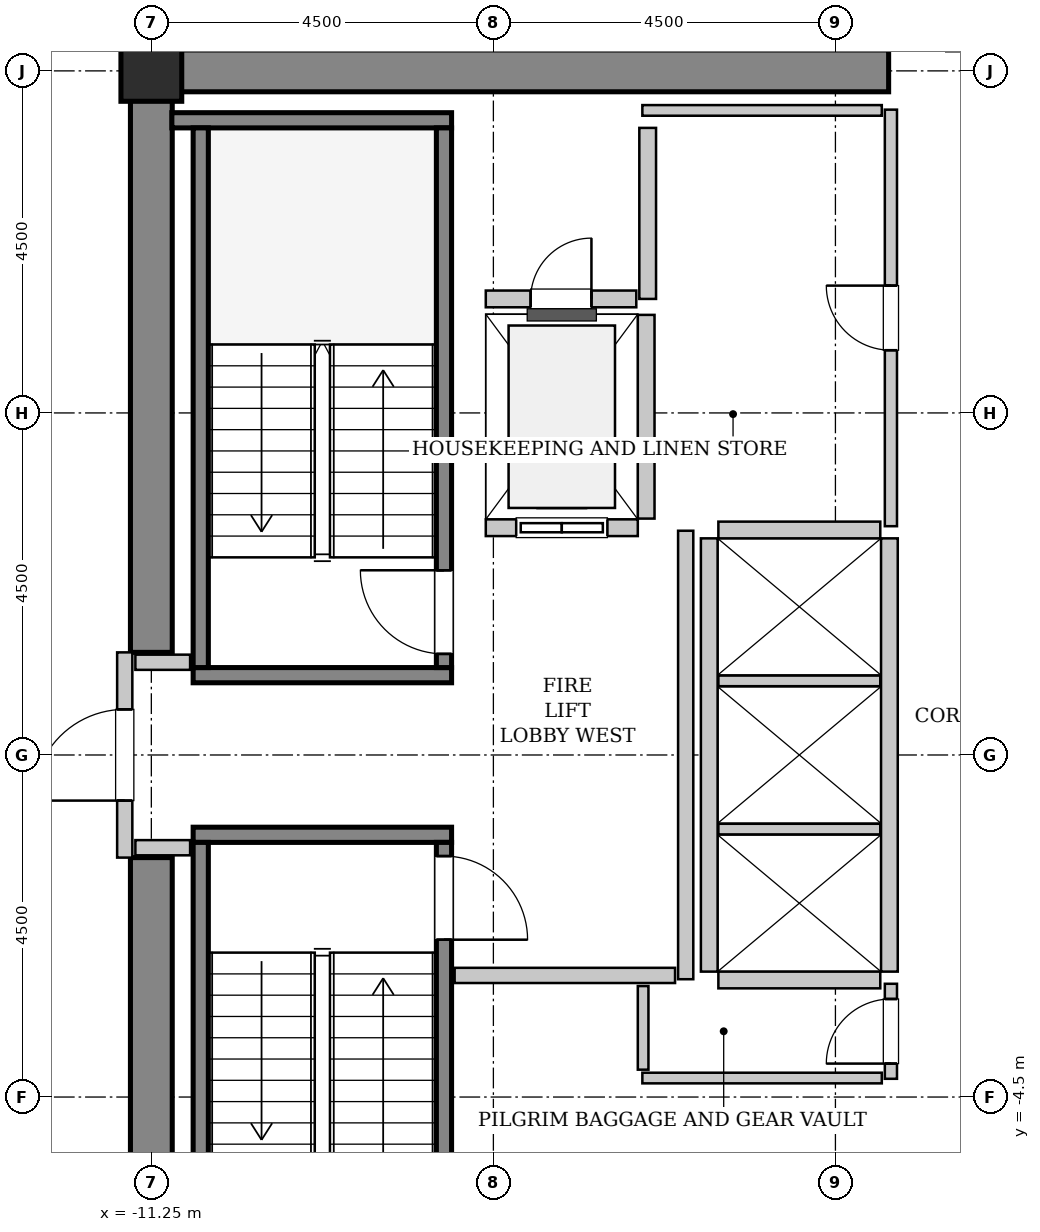
"""IFC4 building model, lengths in metres.
Left out: names, types, materials, properties, quantities, classifications, styles, units other than length and angle.
Written with IfcOpenShell. Run it as: python <this file> out.ifc"""

import sys

from ifc_helpers import new_model, si_unit, direction, frame, frame_2d, origin, origin_2d, place, context, subcontext, project, spatial, rectangle, hollow_rectangle, extrude, source, transform, mapped, element, fill, save


model = new_model("IFC4")
c1 = context("Model", 3, precision=1e-05, world=origin(), true_north=direction((0.0, 1.0)))
c2 = subcontext(c1, "Body", "Model", "MODEL_VIEW")
j1 = project(units=[si_unit("LENGTHUNIT", "METRE"), si_unit("PLANEANGLEUNIT", "RADIAN")], contexts=[c1])
p1 = place(None, origin())
s1 = spatial("IfcSite", under=j1, at=p1, CompositionType="ELEMENT")
p2 = place(p1, origin())
s2 = spatial("IfcBuilding", under=s1, at=p2, CompositionType="ELEMENT")
p3 = place(p2, frame((0.0, 0.0, 194.4)))
s3 = spatial("IfcBuildingStorey", under=s2, at=p3, CompositionType="ELEMENT", Elevation=194.4)
m1 = source(origin(), c2, "Body", "SweptSolid", [
    extrude(rectangle(XDim=9.975, YDim=0.55, at=frame_2d((4.987, 0.0))), origin(), (0.0, 0.0, 1.0), 3.8),
])
p4 = place(p3, frame((-11.525, 9.0, 0.0), z_axis=(0.0, 0.0, 1.0), x_axis=(1.0, 0.0, 0.0)))
e1 = element("IfcWall", 1, at=p4, inside=s3, PredefinedType="SHEAR", context=c2, shape_type="MappedRepresentation", body=[
    mapped(m1, transform((0.0, 0.0, 0.0), x_axis=(1.0, 0.0, 0.0), y_axis=(0.0, 1.0, 0.0), z_axis=(0.0, 0.0, 1.0), scale=1.0)),
])
m2 = source(origin(), c2, "Body", "SweptSolid", [
    extrude(rectangle(XDim=7.375, YDim=0.55, at=frame_2d((3.688, 0.0))), origin(), (0.0, 0.0, 1.0), 3.8),
])
for number, where, z_axis, x_axis in (
    (2, (-11.25, -8.725, 0.0), (0.0, 0.0, 1.0), (0.0, 1.0, 0.0)),
    (3, (-11.25, 1.35, 0.0), (0.0, 0.0, 1.0), (0.0, 1.0, 0.0)),
):
    element("IfcWall", number, at=place(p3, frame(where, z_axis=z_axis, x_axis=x_axis)), inside=s3, PredefinedType="SHEAR", context=c2, shape_type="MappedRepresentation", body=[
        mapped(m2, transform((0.0, 0.0, 0.0), x_axis=(1.0, 0.0, 0.0), y_axis=(0.0, 1.0, 0.0), z_axis=(0.0, 0.0, 1.0), scale=1.0)),
    ])
m3 = source(origin(), c2, "Body", "SweptSolid", [
    extrude(hollow_rectangle(XDim=0.8, YDim=0.8, WallThickness=0.04, InnerFilletRadius=0.04, OuterFilletRadius=0.08, at=origin_2d()), origin(), (0.0, 0.0, 1.0), 3.8),
])
p5 = place(p3, frame((-11.25, 9.0, 0.0), z_axis=(0.0, 0.0, 1.0), x_axis=(1.0, 0.0, 0.0)))
e4 = element("IfcColumn", 4, at=p5, inside=s3, PredefinedType="COLUMN", context=c2, shape_type="MappedRepresentation", body=[
    mapped(m3, transform((0.0, 0.0, 0.0), x_axis=(1.0, 0.0, 0.0), y_axis=(0.0, 1.0, 0.0), z_axis=(0.0, 0.0, 1.0), scale=1.0)),
])
m4 = source(origin(), c2, "Body", "SweptSolid", [
    extrude(rectangle(XDim=3.4, YDim=0.2, at=frame_2d((1.7, 0.0))), origin(), (0.0, 0.0, 1.0), 3.8),
])
p6 = place(p3, frame((-7.3, 1.05, 0.0), z_axis=(0.0, 0.0, 1.0), x_axis=(-1.0, 0.0, 0.0)))
e5 = element("IfcWall", 5, at=p6, inside=s3, PredefinedType="SOLIDWALL", context=c2, shape_type="MappedRepresentation", body=[
    mapped(m4, transform((0.0, 0.0, 0.0), x_axis=(1.0, 0.0, 0.0), y_axis=(0.0, 1.0, 0.0), z_axis=(0.0, 0.0, 1.0), scale=1.0)),
])
m5 = source(origin(), c2, "Body", "SweptSolid", [
    extrude(rectangle(XDim=3.68, YDim=0.2, at=frame_2d((1.84, 0.0))), origin(), (0.0, 0.0, 1.0), 3.8),
])
p7 = place(p3, frame((-7.3, 8.35, 0.0), z_axis=(0.0, 0.0, 1.0), x_axis=(-1.0, 0.0, 0.0)))
e6 = element("IfcWall", 6, at=p7, inside=s3, PredefinedType="SOLIDWALL", context=c2, shape_type="MappedRepresentation", body=[
    mapped(m5, transform((0.0, 0.0, 0.0), x_axis=(1.0, 0.0, 0.0), y_axis=(0.0, 1.0, 0.0), z_axis=(0.0, 0.0, 1.0), scale=1.0)),
])
m6 = source(origin(), c2, "Body", "SweptSolid", [
    extrude(rectangle(XDim=7.1, YDim=0.2, at=frame_2d((3.55, 0.0))), origin(), (0.0, 0.0, 1.0), 3.8),
])
p8 = place(p3, frame((-7.4, 1.15, 0.0), z_axis=(0.0, 0.0, 1.0), x_axis=(0.0, 1.0, 0.0)))
e7 = element("IfcWall", 7, at=p8, inside=s3, PredefinedType="SOLIDWALL", context=c2, shape_type="MappedRepresentation", body=[
    mapped(m6, transform((0.0, 0.0, 0.0), x_axis=(1.0, 0.0, 0.0), y_axis=(0.0, 1.0, 0.0), z_axis=(0.0, 0.0, 1.0), scale=1.0)),
])
p9 = place(p8, frame((0.18, 0.0, 0.0)))
e8 = element("IfcOpeningElement", 8, at=p9, cuts=e7, PredefinedType="OPENING", context=c2, shape_type="SweptSolid", body=[
    extrude(rectangle(XDim=1.1, YDim=2.15, at=frame_2d((0.55, 1.075))), frame((0.0, 0.11, 0.0), z_axis=(0.0, -1.0, 0.0), x_axis=(1.0, 0.0, 0.0)), (0.0, 0.0, 1.0), 0.22),
])
p10 = place(p3, frame((-10.6, 1.15, 0.0), z_axis=(0.0, 0.0, 1.0), x_axis=(0.0, 1.0, 0.0)))
e9 = element("IfcWall", 9, at=p10, inside=s3, PredefinedType="SOLIDWALL", context=c2, shape_type="MappedRepresentation", body=[
    mapped(m6, transform((0.0, 0.0, 0.0), x_axis=(1.0, 0.0, 0.0), y_axis=(0.0, 1.0, 0.0), z_axis=(0.0, 0.0, 1.0), scale=1.0)),
])
p11 = place(p3, frame((-10.7, -1.05, 0.0), z_axis=(0.0, 0.0, 1.0), x_axis=(1.0, 0.0, 0.0)))
e10 = element("IfcWall", 10, at=p11, inside=s3, PredefinedType="SOLIDWALL", context=c2, shape_type="MappedRepresentation", body=[
    mapped(m4, transform((0.0, 0.0, 0.0), x_axis=(1.0, 0.0, 0.0), y_axis=(0.0, 1.0, 0.0), z_axis=(0.0, 0.0, 1.0), scale=1.0)),
])
p12 = place(p3, frame((-10.6, -1.15, 0.0), z_axis=(0.0, 0.0, 1.0), x_axis=(0.0, -1.0, 0.0)))
e11 = element("IfcWall", 11, at=p12, inside=s3, PredefinedType="SOLIDWALL", context=c2, shape_type="MappedRepresentation", body=[
    mapped(m6, transform((0.0, 0.0, 0.0), x_axis=(1.0, 0.0, 0.0), y_axis=(0.0, 1.0, 0.0), z_axis=(0.0, 0.0, 1.0), scale=1.0)),
])
p13 = place(p3, frame((-7.4, -1.15, 0.0), z_axis=(0.0, 0.0, 1.0), x_axis=(0.0, -1.0, 0.0)))
e12 = element("IfcWall", 12, at=p13, inside=s3, PredefinedType="SOLIDWALL", context=c2, shape_type="MappedRepresentation", body=[
    mapped(m6, transform((0.0, 0.0, 0.0), x_axis=(1.0, 0.0, 0.0), y_axis=(0.0, 1.0, 0.0), z_axis=(0.0, 0.0, 1.0), scale=1.0)),
])
p14 = place(p13, frame((0.18, 0.0, 0.0)))
e13 = element("IfcOpeningElement", 13, at=p14, cuts=e12, PredefinedType="OPENING", context=c2, shape_type="SweptSolid", body=[
    extrude(rectangle(XDim=1.1, YDim=2.15, at=frame_2d((0.55, 1.075))), frame((0.0, 0.11, 0.0), z_axis=(0.0, -1.0, 0.0), x_axis=(1.0, 0.0, 0.0)), (0.0, 0.0, 1.0), 0.22),
])
m7 = source(origin(), c2, "Body", "SweptSolid", [
    extrude(rectangle(XDim=2.0, YDim=0.22, at=frame_2d((1.0, 0.0))), origin(), (0.0, 0.0, 1.0), 3.535),
])
p15 = place(p3, frame((-6.85, 2.99, 0.0), z_axis=(0.0, 0.0, 1.0), x_axis=(1.0, 0.0, 0.0)))
e14 = element("IfcWall", 14, at=p15, inside=s3, PredefinedType="SOLIDWALL", context=c2, shape_type="MappedRepresentation", body=[
    mapped(m7, transform((0.0, 0.0, 0.0), x_axis=(1.0, 0.0, 0.0), y_axis=(0.0, 1.0, 0.0), z_axis=(0.0, 0.0, 1.0), scale=1.0)),
])
p16 = place(p15, frame((0.4, 0.0, 0.0)))
e15 = element("IfcOpeningElement", 15, at=p16, cuts=e14, PredefinedType="OPENING", context=c2, shape_type="SweptSolid", body=[
    extrude(rectangle(XDim=1.2, YDim=2.2, at=frame_2d((0.6, 1.1))), frame((0.0, 0.12, 0.0), z_axis=(0.0, -1.0, 0.0), x_axis=(1.0, 0.0, 0.0)), (0.0, 0.0, 1.0), 0.24),
])
m8 = source(origin(), c2, "Body", "SweptSolid", [
    extrude(rectangle(XDim=2.68, YDim=0.22, at=frame_2d((1.34, 0.0))), origin(), (0.0, 0.0, 1.0), 3.535),
])
p17 = place(p3, frame((-4.74, 3.11, 0.0), z_axis=(0.0, 0.0, 1.0), x_axis=(0.0, 1.0, 0.0)))
e16 = element("IfcWall", 16, at=p17, inside=s3, PredefinedType="SOLIDWALL", context=c2, shape_type="MappedRepresentation", body=[
    mapped(m8, transform((0.0, 0.0, 0.0), x_axis=(1.0, 0.0, 0.0), y_axis=(0.0, 1.0, 0.0), z_axis=(0.0, 0.0, 1.0), scale=1.0)),
])
m9 = source(origin(), c2, "Body", "SweptSolid", [
    extrude(rectangle(XDim=5.7, YDim=0.22, at=frame_2d((2.85, 0.0))), origin(), (0.0, 0.0, 1.0), 3.535),
])
for number, where, z_axis, x_axis in (
    (17, (-1.54, -2.85, 0.0), (0.0, 0.0, 1.0), (0.0, 1.0, 0.0)),
    (18, (-3.91, 2.85, 0.0), (0.0, 0.0, 1.0), (0.0, -1.0, 0.0)),
):
    element("IfcWall", number, at=place(p3, frame(where, z_axis=z_axis, x_axis=x_axis)), inside=s3, PredefinedType="SOLIDWALL", context=c2, shape_type="MappedRepresentation", body=[
        mapped(m9, transform((0.0, 0.0, 0.0), x_axis=(1.0, 0.0, 0.0), y_axis=(0.0, 1.0, 0.0), z_axis=(0.0, 0.0, 1.0), scale=1.0)),
    ])
m10 = source(origin(), c2, "Body", "SweptSolid", [
    extrude(rectangle(XDim=2.13, YDim=0.22, at=frame_2d((1.065, 0.0))), origin(), (0.0, 0.0, 1.0), 3.535),
])
p18 = place(p3, frame((-3.79, -2.96, 0.0), z_axis=(0.0, 0.0, 1.0), x_axis=(1.0, 0.0, 0.0)))
e19 = element("IfcWall", 19, at=p18, inside=s3, PredefinedType="SOLIDWALL", context=c2, shape_type="MappedRepresentation", body=[
    mapped(m10, transform((0.0, 0.0, 0.0), x_axis=(1.0, 0.0, 0.0), y_axis=(0.0, 1.0, 0.0), z_axis=(0.0, 0.0, 1.0), scale=1.0)),
])
m11 = source(origin(), c2, "Body", "SweptSolid", [
    extrude(rectangle(XDim=2.13, YDim=0.14, at=frame_2d((1.065, 0.0))), origin(), (0.0, 0.0, 1.0), 3.535),
])
for number, where, z_axis, x_axis in (
    (20, (-3.79, -0.975, 0.0), (0.0, 0.0, 1.0), (1.0, 0.0, 0.0)),
    (21, (-3.79, 0.975, 0.0), (0.0, 0.0, 1.0), (1.0, 0.0, 0.0)),
):
    element("IfcWall", number, at=place(p3, frame(where, z_axis=z_axis, x_axis=x_axis)), inside=s3, PredefinedType="PARTITIONING", context=c2, shape_type="MappedRepresentation", body=[
        mapped(m11, transform((0.0, 0.0, 0.0), x_axis=(1.0, 0.0, 0.0), y_axis=(0.0, 1.0, 0.0), z_axis=(0.0, 0.0, 1.0), scale=1.0)),
    ])
p19 = place(p3, frame((-1.66, 2.96, 0.0), z_axis=(0.0, 0.0, 1.0), x_axis=(-1.0, 0.0, 0.0)))
e22 = element("IfcWall", 22, at=p19, inside=s3, PredefinedType="SOLIDWALL", context=c2, shape_type="MappedRepresentation", body=[
    mapped(m10, transform((0.0, 0.0, 0.0), x_axis=(1.0, 0.0, 0.0), y_axis=(0.0, 1.0, 0.0), z_axis=(0.0, 0.0, 1.0), scale=1.0)),
])
m12 = source(origin(), c2, "Body", "SweptSolid", [
    extrude(rectangle(XDim=2.25, YDim=0.22, at=frame_2d((1.125, 0.0))), origin(), (0.0, 0.0, 1.0), 3.535),
])
p20 = place(p3, frame((-4.72, 6.0, 0.0), z_axis=(0.0, 0.0, 1.0), x_axis=(0.0, 1.0, 0.0)))
e23 = element("IfcWall", 23, at=p20, inside=s3, PredefinedType="SOLIDWALL", context=c2, shape_type="MappedRepresentation", body=[
    mapped(m12, transform((0.0, 0.0, 0.0), x_axis=(1.0, 0.0, 0.0), y_axis=(0.0, 1.0, 0.0), z_axis=(0.0, 0.0, 1.0), scale=1.0)),
])
m13 = source(origin(), c2, "Body", "SweptSolid", [
    extrude(rectangle(XDim=1.98, YDim=0.22, at=frame_2d((0.99, 0.0))), origin(), (0.0, 0.0, 1.0), 3.535),
])
p21 = place(p3, frame((-6.85, 6.0, 0.0), z_axis=(0.0, 0.0, 1.0), x_axis=(1.0, 0.0, 0.0)))
e24 = element("IfcWall", 24, at=p21, inside=s3, PredefinedType="SOLIDWALL", context=c2, shape_type="MappedRepresentation", body=[
    mapped(m13, transform((0.0, 0.0, 0.0), x_axis=(1.0, 0.0, 0.0), y_axis=(0.0, 1.0, 0.0), z_axis=(0.0, 0.0, 1.0), scale=1.0)),
])
p22 = place(p21, frame((0.59, 0.0, 0.0)))
e25 = element("IfcOpeningElement", 25, at=p22, cuts=e24, PredefinedType="OPENING", context=c2, shape_type="SweptSolid", body=[
    extrude(rectangle(XDim=0.8, YDim=2.0, at=frame_2d((0.4, 1.0))), frame((0.0, 0.12, 0.0), z_axis=(0.0, -1.0, 0.0), x_axis=(1.0, 0.0, 0.0)), (0.0, 0.0, 1.0), 0.24),
])
m14 = source(origin(), c2, "Body", "SweptSolid", [
    extrude(rectangle(XDim=2.7, YDim=0.2, at=frame_2d((1.35, 0.0))), origin(), (0.0, 0.0, 1.0), 2.425),
])
p23 = place(p3, frame((-11.6, -1.35, 0.0), z_axis=(0.0, 0.0, 1.0), x_axis=(0.0, 1.0, 0.0)))
e26 = element("IfcWall", 26, at=p23, inside=s3, PredefinedType="PARTITIONING", context=c2, shape_type="MappedRepresentation", body=[
    mapped(m14, transform((0.0, 0.0, 0.0), x_axis=(1.0, 0.0, 0.0), y_axis=(0.0, 1.0, 0.0), z_axis=(0.0, 0.0, 1.0), scale=1.0)),
])
p24 = place(p23, frame((0.75, 0.0, 0.0)))
e27 = element("IfcOpeningElement", 27, at=p24, cuts=e26, PredefinedType="OPENING", context=c2, shape_type="SweptSolid", body=[
    extrude(rectangle(XDim=1.2, YDim=2.15, at=frame_2d((0.6, 1.075))), frame((0.0, 0.11, 0.0), z_axis=(0.0, -1.0, 0.0), x_axis=(1.0, 0.0, 0.0)), (0.0, 0.0, 1.0), 0.22),
])
m15 = source(origin(), c2, "Body", "SweptSolid", [
    extrude(rectangle(XDim=5.9, YDim=0.2, at=frame_2d((2.95, 0.0))), origin(), (0.0, 0.0, 1.0), 3.535),
])
p25 = place(p3, frame((-4.22, -2.95, 0.0), z_axis=(0.0, 0.0, 1.0), x_axis=(0.0, 1.0, 0.0)))
e28 = element("IfcWall", 28, at=p25, inside=s3, PredefinedType="PARTITIONING", context=c2, shape_type="MappedRepresentation", body=[
    mapped(m15, transform((0.0, 0.0, 0.0), x_axis=(1.0, 0.0, 0.0), y_axis=(0.0, 1.0, 0.0), z_axis=(0.0, 0.0, 1.0), scale=1.0)),
])
m16 = source(origin(), c2, "Body", "SweptSolid", [
    extrude(rectangle(XDim=2.9, YDim=0.2, at=frame_2d((1.45, 0.0))), origin(), (0.0, 0.0, 1.0), 3.535),
])
p26 = place(p3, frame((-7.26, -2.9, 0.0), z_axis=(0.0, 0.0, 1.0), x_axis=(1.0, 0.0, 0.0)))
e29 = element("IfcWall", 29, at=p26, inside=s3, PredefinedType="PARTITIONING", context=c2, shape_type="MappedRepresentation", body=[
    mapped(m16, transform((0.0, 0.0, 0.0), x_axis=(1.0, 0.0, 0.0), y_axis=(0.0, 1.0, 0.0), z_axis=(0.0, 0.0, 1.0), scale=1.0)),
])
m17 = source(origin(), c2, "Body", "SweptSolid", [
    extrude(rectangle(XDim=0.72, YDim=0.2, at=frame_2d((0.36, 0.0))), origin(), (0.0, 0.0, 1.0), 3.535),
])
for number, where, z_axis, x_axis in (
    (30, (-11.46, 1.22, 0.0), (0.0, 0.0, 1.0), (1.0, 0.0, 0.0)),
    (31, (-11.46, -1.22, 0.0), (0.0, 0.0, 1.0), (1.0, 0.0, 0.0)),
):
    element("IfcWall", number, at=place(p3, frame(where, z_axis=z_axis, x_axis=x_axis)), inside=s3, PredefinedType="PARTITIONING", context=c2, shape_type="MappedRepresentation", body=[
        mapped(m17, transform((0.0, 0.0, 0.0), x_axis=(1.0, 0.0, 0.0), y_axis=(0.0, 1.0, 0.0), z_axis=(0.0, 0.0, 1.0), scale=1.0)),
    ])
m18 = source(origin(), c2, "Body", "SweptSolid", [
    extrude(rectangle(XDim=5.48, YDim=0.16, at=frame_2d((2.74, 0.0))), origin(), (0.0, 0.0, 1.0), 3.535),
])
p27 = place(p3, frame((-1.52, 3.01, 0.0), z_axis=(0.0, 0.0, 1.0), x_axis=(0.0, 1.0, 0.0)))
e32 = element("IfcWall", 32, at=p27, inside=s3, PredefinedType="PARTITIONING", context=c2, shape_type="MappedRepresentation", body=[
    mapped(m18, transform((0.0, 0.0, 0.0), x_axis=(1.0, 0.0, 0.0), y_axis=(0.0, 1.0, 0.0), z_axis=(0.0, 0.0, 1.0), scale=1.0)),
])
p28 = place(p27, frame((2.315, 0.0, 0.0)))
e33 = element("IfcOpeningElement", 33, at=p28, cuts=e32, PredefinedType="OPENING", context=c2, shape_type="SweptSolid", body=[
    extrude(rectangle(XDim=0.85, YDim=2.1, at=frame_2d((0.425, 1.05))), frame((0.0, 0.09, 0.0), z_axis=(0.0, -1.0, 0.0), x_axis=(1.0, 0.0, 0.0)), (0.0, 0.0, 1.0), 0.18),
])
m19 = source(origin(), c2, "Body", "SweptSolid", [
    extrude(rectangle(XDim=3.15, YDim=0.14, at=frame_2d((1.575, 0.0))), origin(), (0.0, 0.0, 1.0), 3.535),
])
p29 = place(p3, frame((-4.79, 8.48, 0.0), z_axis=(0.0, 0.0, 1.0), x_axis=(1.0, 0.0, 0.0)))
e34 = element("IfcWall", 34, at=p29, inside=s3, PredefinedType="PARTITIONING", context=c2, shape_type="MappedRepresentation", body=[
    mapped(m19, transform((0.0, 0.0, 0.0), x_axis=(1.0, 0.0, 0.0), y_axis=(0.0, 1.0, 0.0), z_axis=(0.0, 0.0, 1.0), scale=1.0)),
])
m20 = source(origin(), c2, "Body", "SweptSolid", [
    extrude(rectangle(XDim=1.25, YDim=0.16, at=frame_2d((0.625, 0.0))), origin(), (0.0, 0.0, 1.0), 3.535),
])
p30 = place(p3, frame((-1.52, -4.26, 0.0), z_axis=(0.0, 0.0, 1.0), x_axis=(0.0, 1.0, 0.0)))
e35 = element("IfcWall", 35, at=p30, inside=s3, PredefinedType="PARTITIONING", context=c2, shape_type="MappedRepresentation", body=[
    mapped(m20, transform((0.0, 0.0, 0.0), x_axis=(1.0, 0.0, 0.0), y_axis=(0.0, 1.0, 0.0), z_axis=(0.0, 0.0, 1.0), scale=1.0)),
])
p31 = place(p30, frame((0.2, 0.0, 0.0)))
e36 = element("IfcOpeningElement", 36, at=p31, cuts=e35, PredefinedType="OPENING", context=c2, shape_type="SweptSolid", body=[
    extrude(rectangle(XDim=0.85, YDim=2.1, at=frame_2d((0.425, 1.05))), frame((0.0, 0.09, 0.0), z_axis=(0.0, -1.0, 0.0), x_axis=(1.0, 0.0, 0.0)), (0.0, 0.0, 1.0), 0.18),
])
p32 = place(p3, frame((-4.79, -4.25, 0.0), z_axis=(0.0, 0.0, 1.0), x_axis=(1.0, 0.0, 0.0)))
e37 = element("IfcWall", 37, at=p32, inside=s3, PredefinedType="PARTITIONING", context=c2, shape_type="MappedRepresentation", body=[
    mapped(m19, transform((0.0, 0.0, 0.0), x_axis=(1.0, 0.0, 0.0), y_axis=(0.0, 1.0, 0.0), z_axis=(0.0, 0.0, 1.0), scale=1.0)),
])
m21 = source(origin(), c2, "Body", "SweptSolid", [
    extrude(rectangle(XDim=1.1, YDim=0.14, at=frame_2d((0.55, 0.0))), origin(), (0.0, 0.0, 1.0), 3.535),
])
p33 = place(p3, frame((-4.78, -4.14, 0.0), z_axis=(0.0, 0.0, 1.0), x_axis=(0.0, 1.0, 0.0)))
e38 = element("IfcWall", 38, at=p33, inside=s3, PredefinedType="PARTITIONING", context=c2, shape_type="MappedRepresentation", body=[
    mapped(m21, transform((0.0, 0.0, 0.0), x_axis=(1.0, 0.0, 0.0), y_axis=(0.0, 1.0, 0.0), z_axis=(0.0, 0.0, 1.0), scale=1.0)),
])
m22 = source(origin(), c2, "Body", "SweptSolid", [
    extrude(rectangle(XDim=1.1, YDim=2.15, at=frame_2d((0.55, 1.075))), frame((0.0, 0.025, 0.0), z_axis=(0.0, -1.0, 0.0), x_axis=(1.0, 0.0, 0.0)), (0.0, 0.0, 1.0), 0.05),
])
p34 = place(p9, origin())
e39 = element("IfcDoor", 39, at=p34, inside=s3, OperationType="SINGLE_SWING_RIGHT", PredefinedType="DOOR", context=c2, shape_type="MappedRepresentation", body=[
    mapped(m22, transform((0.0, 0.0, 0.0), x_axis=(1.0, 0.0, 0.0), y_axis=(0.0, 1.0, 0.0), z_axis=(0.0, 0.0, 1.0), scale=1.0)),
])
fill(e8, e39)
p35 = place(p14, origin())
e40 = element("IfcDoor", 40, at=p35, inside=s3, OperationType="SINGLE_SWING_RIGHT", PredefinedType="DOOR", context=c2, shape_type="MappedRepresentation", body=[
    mapped(m22, transform((0.0, 0.0, 0.0), x_axis=(1.0, 0.0, 0.0), y_axis=(0.0, 1.0, 0.0), z_axis=(0.0, 0.0, 1.0), scale=1.0)),
])
fill(e13, e40)
m23 = source(origin(), c2, "Body", "SweptSolid", [
    extrude(rectangle(XDim=1.2, YDim=2.2, at=frame_2d((0.6, 1.1))), frame((0.0, 0.025, 0.0), z_axis=(0.0, -1.0, 0.0), x_axis=(1.0, 0.0, 0.0)), (0.0, 0.0, 1.0), 0.05),
])
p36 = place(p16, origin())
e41 = element("IfcDoor", 41, at=p36, inside=s3, OperationType="SLIDING_TO_LEFT", PredefinedType="DOOR", context=c2, shape_type="MappedRepresentation", body=[
    mapped(m23, transform((0.0, 0.0, 0.0), x_axis=(1.0, 0.0, 0.0), y_axis=(0.0, 1.0, 0.0), z_axis=(0.0, 0.0, 1.0), scale=1.0)),
])
fill(e15, e41)
m24 = source(origin(), c2, "Body", "SweptSolid", [
    extrude(rectangle(XDim=0.8, YDim=2.0, at=frame_2d((0.4, 1.0))), frame((0.0, 0.025, 0.0), z_axis=(0.0, -1.0, 0.0), x_axis=(1.0, 0.0, 0.0)), (0.0, 0.0, 1.0), 0.05),
])
p37 = place(p22, origin())
e42 = element("IfcDoor", 42, at=p37, inside=s3, OperationType="SINGLE_SWING_RIGHT", PredefinedType="TRAPDOOR", context=c2, shape_type="MappedRepresentation", body=[
    mapped(m24, transform((0.0, 0.0, 0.0), x_axis=(1.0, 0.0, 0.0), y_axis=(0.0, 1.0, 0.0), z_axis=(0.0, 0.0, 1.0), scale=1.0)),
])
fill(e25, e42)
m25 = source(origin(), c2, "Body", "SweptSolid", [
    extrude(rectangle(XDim=1.2, YDim=2.15, at=frame_2d((0.6, 1.075))), frame((0.0, 0.025, 0.0), z_axis=(0.0, -1.0, 0.0), x_axis=(1.0, 0.0, 0.0)), (0.0, 0.0, 1.0), 0.05),
])
p38 = place(p24, origin())
e43 = element("IfcDoor", 43, at=p38, inside=s3, OperationType="SINGLE_SWING_LEFT", PredefinedType="DOOR", context=c2, shape_type="MappedRepresentation", body=[
    mapped(m25, transform((0.0, 0.0, 0.0), x_axis=(1.0, 0.0, 0.0), y_axis=(0.0, 1.0, 0.0), z_axis=(0.0, 0.0, 1.0), scale=1.0)),
])
fill(e27, e43)
m26 = source(origin(), c2, "Body", "SweptSolid", [
    extrude(rectangle(XDim=0.85, YDim=2.1, at=frame_2d((0.425, 1.05))), frame((0.0, 0.025, 0.0), z_axis=(0.0, -1.0, 0.0), x_axis=(1.0, 0.0, 0.0)), (0.0, 0.0, 1.0), 0.05),
])
p39 = place(p28, origin())
e44 = element("IfcDoor", 44, at=p39, inside=s3, OperationType="SINGLE_SWING_RIGHT", PredefinedType="DOOR", context=c2, shape_type="MappedRepresentation", body=[
    mapped(m26, transform((0.0, 0.0, 0.0), x_axis=(1.0, 0.0, 0.0), y_axis=(0.0, 1.0, 0.0), z_axis=(0.0, 0.0, 1.0), scale=1.0)),
])
fill(e33, e44)
p40 = place(p31, origin())
e45 = element("IfcDoor", 45, at=p40, inside=s3, OperationType="SINGLE_SWING_LEFT", PredefinedType="DOOR", context=c2, shape_type="MappedRepresentation", body=[
    mapped(m26, transform((0.0, 0.0, 0.0), x_axis=(1.0, 0.0, 0.0), y_axis=(0.0, 1.0, 0.0), z_axis=(0.0, 0.0, 1.0), scale=1.0)),
])
fill(e36, e45)
save(model, sys.argv[1])
